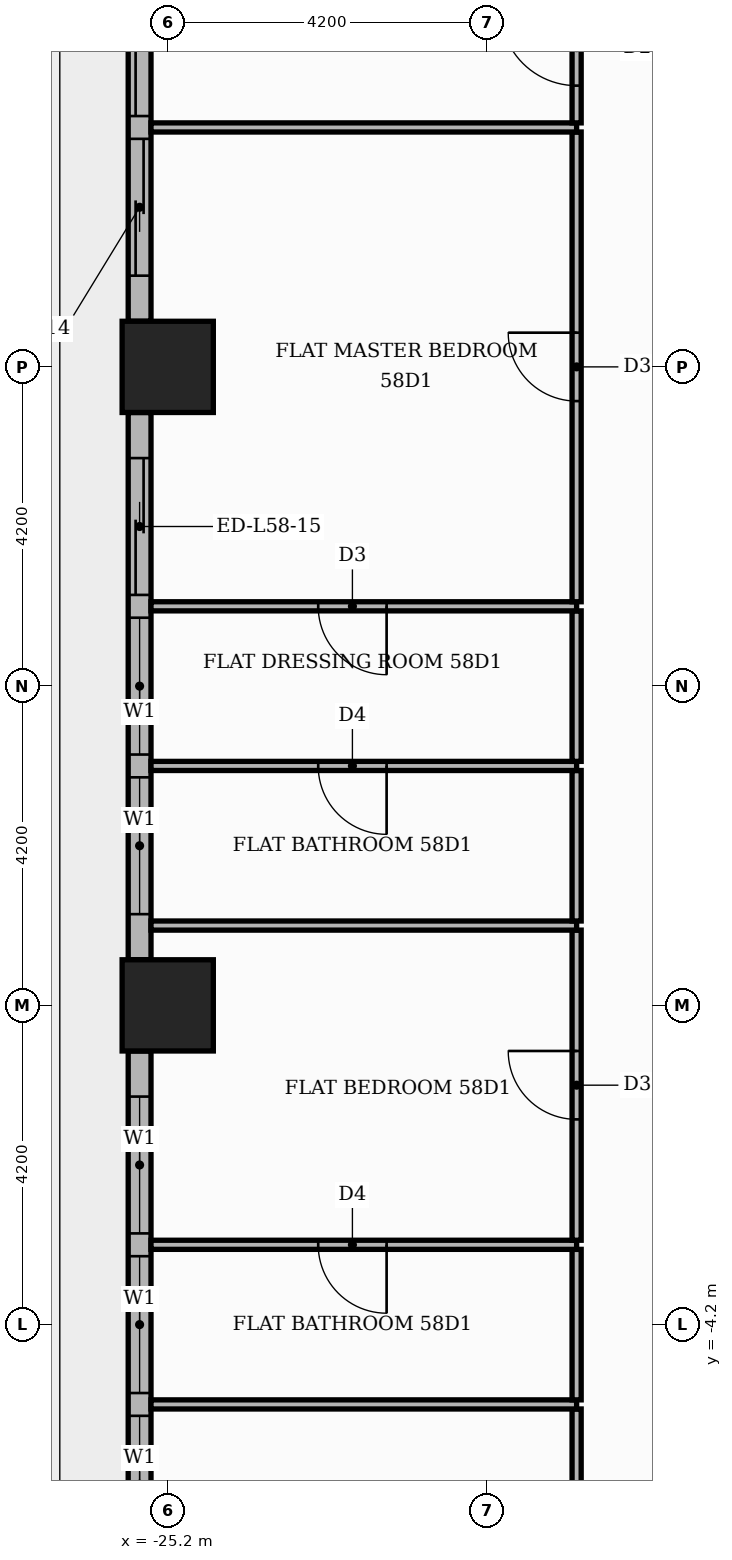
"""IFC4 building model, lengths in metres.
Left out: names, types, materials, properties, quantities, classifications, styles, units other than length and angle.
Written with IfcOpenShell. Run it as: python <this file> out.ifc"""

import sys

from ifc_helpers import new_model, si_unit, direction, frame, frame_2d, origin, origin_2d, place, context, subcontext, project, spatial, rectangle, extrude, element, fill, save


model = new_model("IFC4")
c1 = context("Model", 3, precision=1e-05, world=origin(), true_north=direction((0.0, 1.0)))
c2 = subcontext(c1, "Body", "Model", "MODEL_VIEW")
j1 = project(units=[si_unit("LENGTHUNIT", "METRE"), si_unit("PLANEANGLEUNIT", "RADIAN")], contexts=[c1])
p1 = place(None, origin())
s1 = spatial("IfcSite", under=j1, at=p1, CompositionType="ELEMENT")
p2 = place(p1, origin())
s2 = spatial("IfcBuilding", under=s1, at=p2, CompositionType="ELEMENT")
p3 = place(p2, frame((0.0, 0.0, 244.5)))
s3 = spatial("IfcBuildingStorey", under=s2, at=p3, CompositionType="ELEMENT", Elevation=244.5)
for number, where, z_axis, x_axis in (
    (1, (-25.2, 0.0, 0.0), (0.0, 0.0, 1.0), (1.0, 0.0, 0.0)),
    (2, (-25.2, 8.4, 0.0), (0.0, 0.0, 1.0), (1.0, 0.0, 0.0)),
):
    element("IfcColumn", number, at=place(p3, frame(where, z_axis=z_axis, x_axis=x_axis)), inside=s3, PredefinedType="COLUMN", context=c2, shape_type="SweptSolid", body=[
        extrude(rectangle(XDim=1.2, YDim=1.2, at=origin_2d()), origin(), (0.0, 0.0, 1.0), 3.9),
    ])
p4 = place(p3, frame((-25.57, 16.2, 0.0), z_axis=(0.0, 0.0, 1.0), x_axis=(0.0, -1.0, 0.0)))
e3 = element("IfcWall", 3, at=p4, inside=s3, PredefinedType="STANDARD", context=c2, shape_type="SweptSolid", body=[
    extrude(rectangle(XDim=7.2, YDim=0.3, at=frame_2d((3.6, 0.0))), origin(), (0.0, 0.0, 1.0), 3.48),
])
p5 = place(p4, frame((0.6, 0.0, 0.0)))
e4 = element("IfcOpeningElement", 4, at=p5, cuts=e3, PredefinedType="OPENING", context=c2, shape_type="SweptSolid", body=[
    extrude(rectangle(XDim=3.9, YDim=2.4, at=frame_2d((1.95, 1.2))), frame((0.0, 0.16, 0.0), z_axis=(0.0, -1.0, 0.0), x_axis=(1.0, 0.0, 0.0)), (0.0, 0.0, 1.0), 0.32),
])
p6 = place(p4, frame((4.8, 0.0, 0.0)))
e5 = element("IfcOpeningElement", 5, at=p6, cuts=e3, PredefinedType="OPENING", context=c2, shape_type="SweptSolid", body=[
    extrude(rectangle(XDim=1.8, YDim=2.4, at=frame_2d((0.9, 1.2))), frame((0.0, 0.16, 0.0), z_axis=(0.0, -1.0, 0.0), x_axis=(1.0, 0.0, 0.0)), (0.0, 0.0, 1.0), 0.32),
])
p7 = place(p3, frame((-25.57, 7.8, 0.0), z_axis=(0.0, 0.0, 1.0), x_axis=(0.0, -1.0, 0.0)))
e6 = element("IfcWall", 6, at=p7, inside=s3, PredefinedType="STANDARD", context=c2, shape_type="SweptSolid", body=[
    extrude(rectangle(XDim=7.2, YDim=0.3, at=frame_2d((3.6, 0.0))), origin(), (0.0, 0.0, 1.0), 3.48),
])
p8 = place(p7, frame((0.6, 0.0, 0.0)))
e7 = element("IfcOpeningElement", 7, at=p8, cuts=e6, PredefinedType="OPENING", context=c2, shape_type="SweptSolid", body=[
    extrude(rectangle(XDim=1.8, YDim=2.4, at=frame_2d((0.9, 1.2))), frame((0.0, 0.16, 0.0), z_axis=(0.0, -1.0, 0.0), x_axis=(1.0, 0.0, 0.0)), (0.0, 0.0, 1.0), 0.32),
])
p9 = place(p7, frame((2.7, 0.0, 0.9)))
e8 = element("IfcOpeningElement", 8, at=p9, cuts=e6, PredefinedType="OPENING", context=c2, shape_type="SweptSolid", body=[
    extrude(rectangle(XDim=1.8, YDim=2.1, at=frame_2d((0.9, 1.05))), frame((0.0, 0.16, 0.0), z_axis=(0.0, -1.0, 0.0), x_axis=(1.0, 0.0, 0.0)), (0.0, 0.0, 1.0), 0.32),
])
p10 = place(p7, frame((4.8, 0.0, 0.9)))
e9 = element("IfcOpeningElement", 9, at=p10, cuts=e6, PredefinedType="OPENING", context=c2, shape_type="SweptSolid", body=[
    extrude(rectangle(XDim=1.8, YDim=2.1, at=frame_2d((0.9, 1.05))), frame((0.0, 0.16, 0.0), z_axis=(0.0, -1.0, 0.0), x_axis=(1.0, 0.0, 0.0)), (0.0, 0.0, 1.0), 0.32),
])
p11 = place(p3, frame((-25.57, -0.6, 0.0), z_axis=(0.0, 0.0, 1.0), x_axis=(0.0, -1.0, 0.0)))
e10 = element("IfcWall", 10, at=p11, inside=s3, PredefinedType="STANDARD", context=c2, shape_type="SweptSolid", body=[
    extrude(rectangle(XDim=7.2, YDim=0.3, at=frame_2d((3.6, 0.0))), origin(), (0.0, 0.0, 1.0), 3.48),
])
p12 = place(p11, frame((0.6, 0.0, 0.9)))
e11 = element("IfcOpeningElement", 11, at=p12, cuts=e10, PredefinedType="OPENING", context=c2, shape_type="SweptSolid", body=[
    extrude(rectangle(XDim=1.8, YDim=2.1, at=frame_2d((0.9, 1.05))), frame((0.0, 0.16, 0.0), z_axis=(0.0, -1.0, 0.0), x_axis=(1.0, 0.0, 0.0)), (0.0, 0.0, 1.0), 0.32),
])
p13 = place(p11, frame((2.7, 0.0, 0.9)))
e12 = element("IfcOpeningElement", 12, at=p13, cuts=e10, PredefinedType="OPENING", context=c2, shape_type="SweptSolid", body=[
    extrude(rectangle(XDim=1.8, YDim=2.1, at=frame_2d((0.9, 1.05))), frame((0.0, 0.16, 0.0), z_axis=(0.0, -1.0, 0.0), x_axis=(1.0, 0.0, 0.0)), (0.0, 0.0, 1.0), 0.32),
])
p14 = place(p11, frame((4.8, 0.0, 0.9)))
e13 = element("IfcOpeningElement", 13, at=p14, cuts=e10, PredefinedType="OPENING", context=c2, shape_type="SweptSolid", body=[
    extrude(rectangle(XDim=1.8, YDim=2.1, at=frame_2d((0.9, 1.05))), frame((0.0, 0.16, 0.0), z_axis=(0.0, -1.0, 0.0), x_axis=(1.0, 0.0, 0.0)), (0.0, 0.0, 1.0), 0.32),
])
p15 = place(p3, frame((-19.82, -11.49, 0.0), z_axis=(0.0, 0.0, 1.0), x_axis=(0.0, 1.0, 0.0)))
e14 = element("IfcWall", 14, at=p15, inside=s3, PredefinedType="PARTITIONING", context=c2, shape_type="SweptSolid", body=[
    extrude(rectangle(XDim=6.18, YDim=0.12, at=frame_2d((3.09, 0.0))), origin(), (0.0, 0.0, 1.0), 3.48),
])
p16 = place(p15, frame((2.64, 0.0, 0.0)))
e15 = element("IfcOpeningElement", 15, at=p16, cuts=e14, PredefinedType="OPENING", context=c2, shape_type="SweptSolid", body=[
    extrude(rectangle(XDim=0.9, YDim=2.1, at=frame_2d((0.45, 1.05))), frame((0.0, 0.07, 0.0), z_axis=(0.0, -1.0, 0.0), x_axis=(1.0, 0.0, 0.0)), (0.0, 0.0, 1.0), 0.14),
])
p17 = place(p3, frame((-25.42, -5.25, 0.0), z_axis=(0.0, 0.0, 1.0), x_axis=(1.0, 0.0, 0.0)))
e16 = element("IfcWall", 16, at=p17, inside=s3, PredefinedType="PARTITIONING", context=c2, shape_type="SweptSolid", body=[
    extrude(rectangle(XDim=5.6, YDim=0.12, at=frame_2d((2.8, 0.0))), origin(), (0.0, 0.0, 1.0), 3.48),
])
p18 = place(p3, frame((-19.82, -5.19, 0.0), z_axis=(0.0, 0.0, 1.0), x_axis=(0.0, 1.0, 0.0)))
e17 = element("IfcWall", 17, at=p18, inside=s3, PredefinedType="PARTITIONING", context=c2, shape_type="SweptSolid", body=[
    extrude(rectangle(XDim=1.98, YDim=0.12, at=frame_2d((0.99, 0.0))), origin(), (0.0, 0.0, 1.0), 3.48),
])
p19 = place(p3, frame((-25.42, -3.15, 0.0), z_axis=(0.0, 0.0, 1.0), x_axis=(1.0, 0.0, 0.0)))
e18 = element("IfcWall", 18, at=p19, inside=s3, PredefinedType="PARTITIONING", context=c2, shape_type="SweptSolid", body=[
    extrude(rectangle(XDim=5.6, YDim=0.12, at=frame_2d((2.8, 0.0))), origin(), (0.0, 0.0, 1.0), 3.48),
])
p20 = place(p19, frame((2.2, 0.0, 0.0)))
e19 = element("IfcOpeningElement", 19, at=p20, cuts=e18, PredefinedType="OPENING", context=c2, shape_type="SweptSolid", body=[
    extrude(rectangle(XDim=0.9, YDim=2.1, at=frame_2d((0.45, 1.05))), frame((0.0, 0.07, 0.0), z_axis=(0.0, -1.0, 0.0), x_axis=(1.0, 0.0, 0.0)), (0.0, 0.0, 1.0), 0.14),
])
p21 = place(p3, frame((-19.82, -3.09, 0.0), z_axis=(0.0, 0.0, 1.0), x_axis=(0.0, 1.0, 0.0)))
e20 = element("IfcWall", 20, at=p21, inside=s3, PredefinedType="PARTITIONING", context=c2, shape_type="SweptSolid", body=[
    extrude(rectangle(XDim=4.08, YDim=0.12, at=frame_2d((2.04, 0.0))), origin(), (0.0, 0.0, 1.0), 3.48),
])
p22 = place(p21, frame((1.59, 0.0, 0.0)))
e21 = element("IfcOpeningElement", 21, at=p22, cuts=e20, PredefinedType="OPENING", context=c2, shape_type="SweptSolid", body=[
    extrude(rectangle(XDim=0.9, YDim=2.1, at=frame_2d((0.45, 1.05))), frame((0.0, 0.07, 0.0), z_axis=(0.0, -1.0, 0.0), x_axis=(1.0, 0.0, 0.0)), (0.0, 0.0, 1.0), 0.14),
])
p23 = place(p3, frame((-25.42, 1.05, 0.0), z_axis=(0.0, 0.0, 1.0), x_axis=(1.0, 0.0, 0.0)))
e22 = element("IfcWall", 22, at=p23, inside=s3, PredefinedType="PARTITIONING", context=c2, shape_type="SweptSolid", body=[
    extrude(rectangle(XDim=5.6, YDim=0.12, at=frame_2d((2.8, 0.0))), origin(), (0.0, 0.0, 1.0), 3.48),
])
p24 = place(p3, frame((-19.82, 1.11, 0.0), z_axis=(0.0, 0.0, 1.0), x_axis=(0.0, 1.0, 0.0)))
e23 = element("IfcWall", 23, at=p24, inside=s3, PredefinedType="PARTITIONING", context=c2, shape_type="SweptSolid", body=[
    extrude(rectangle(XDim=1.98, YDim=0.12, at=frame_2d((0.99, 0.0))), origin(), (0.0, 0.0, 1.0), 3.48),
])
p25 = place(p3, frame((-25.42, 3.15, 0.0), z_axis=(0.0, 0.0, 1.0), x_axis=(1.0, 0.0, 0.0)))
e24 = element("IfcWall", 24, at=p25, inside=s3, PredefinedType="PARTITIONING", context=c2, shape_type="SweptSolid", body=[
    extrude(rectangle(XDim=5.6, YDim=0.12, at=frame_2d((2.8, 0.0))), origin(), (0.0, 0.0, 1.0), 3.48),
])
p26 = place(p25, frame((2.2, 0.0, 0.0)))
e25 = element("IfcOpeningElement", 25, at=p26, cuts=e24, PredefinedType="OPENING", context=c2, shape_type="SweptSolid", body=[
    extrude(rectangle(XDim=0.9, YDim=2.1, at=frame_2d((0.45, 1.05))), frame((0.0, 0.07, 0.0), z_axis=(0.0, -1.0, 0.0), x_axis=(1.0, 0.0, 0.0)), (0.0, 0.0, 1.0), 0.14),
])
p27 = place(p3, frame((-19.82, 3.21, 0.0), z_axis=(0.0, 0.0, 1.0), x_axis=(0.0, 1.0, 0.0)))
e26 = element("IfcWall", 26, at=p27, inside=s3, PredefinedType="PARTITIONING", context=c2, shape_type="SweptSolid", body=[
    extrude(rectangle(XDim=1.98, YDim=0.12, at=frame_2d((0.99, 0.0))), origin(), (0.0, 0.0, 1.0), 3.48),
])
p28 = place(p3, frame((-25.42, 5.25, 0.0), z_axis=(0.0, 0.0, 1.0), x_axis=(1.0, 0.0, 0.0)))
e27 = element("IfcWall", 27, at=p28, inside=s3, PredefinedType="PARTITIONING", context=c2, shape_type="SweptSolid", body=[
    extrude(rectangle(XDim=5.6, YDim=0.12, at=frame_2d((2.8, 0.0))), origin(), (0.0, 0.0, 1.0), 3.48),
])
p29 = place(p28, frame((2.2, 0.0, 0.0)))
e28 = element("IfcOpeningElement", 28, at=p29, cuts=e27, PredefinedType="OPENING", context=c2, shape_type="SweptSolid", body=[
    extrude(rectangle(XDim=0.9, YDim=2.1, at=frame_2d((0.45, 1.05))), frame((0.0, 0.07, 0.0), z_axis=(0.0, -1.0, 0.0), x_axis=(1.0, 0.0, 0.0)), (0.0, 0.0, 1.0), 0.14),
])
p30 = place(p3, frame((-19.82, 5.31, 0.0), z_axis=(0.0, 0.0, 1.0), x_axis=(0.0, 1.0, 0.0)))
e29 = element("IfcWall", 29, at=p30, inside=s3, PredefinedType="PARTITIONING", context=c2, shape_type="SweptSolid", body=[
    extrude(rectangle(XDim=6.18, YDim=0.12, at=frame_2d((3.09, 0.0))), origin(), (0.0, 0.0, 1.0), 3.48),
])
p31 = place(p30, frame((2.64, 0.0, 0.0)))
e30 = element("IfcOpeningElement", 30, at=p31, cuts=e29, PredefinedType="OPENING", context=c2, shape_type="SweptSolid", body=[
    extrude(rectangle(XDim=0.9, YDim=2.1, at=frame_2d((0.45, 1.05))), frame((0.0, 0.07, 0.0), z_axis=(0.0, -1.0, 0.0), x_axis=(1.0, 0.0, 0.0)), (0.0, 0.0, 1.0), 0.14),
])
p32 = place(p3, frame((-25.42, 11.55, 0.0), z_axis=(0.0, 0.0, 1.0), x_axis=(1.0, 0.0, 0.0)))
e31 = element("IfcWall", 31, at=p32, inside=s3, PredefinedType="PARTITIONING", context=c2, shape_type="SweptSolid", body=[
    extrude(rectangle(XDim=5.6, YDim=0.12, at=frame_2d((2.8, 0.0))), origin(), (0.0, 0.0, 1.0), 3.48),
])
p33 = place(p3, frame((-19.82, 11.61, 0.0), z_axis=(0.0, 0.0, 1.0), x_axis=(0.0, 1.0, 0.0)))
e32 = element("IfcWall", 32, at=p33, inside=s3, PredefinedType="PARTITIONING", context=c2, shape_type="SweptSolid", body=[
    extrude(rectangle(XDim=1.98, YDim=0.12, at=frame_2d((0.99, 0.0))), origin(), (0.0, 0.0, 1.0), 3.48),
])
p34 = place(p33, frame((0.49, 0.0, 0.0)))
e33 = element("IfcOpeningElement", 33, at=p34, cuts=e32, PredefinedType="OPENING", context=c2, shape_type="SweptSolid", body=[
    extrude(rectangle(XDim=1.0, YDim=2.1, at=frame_2d((0.5, 1.05))), frame((0.0, 0.07, 0.0), z_axis=(0.0, -1.0, 0.0), x_axis=(1.0, 0.0, 0.0)), (0.0, 0.0, 1.0), 0.14),
])
p35 = place(p5, origin())
e34 = element("IfcDoor", 34, at=p35, inside=s3, OperationType="SLIDING_TO_LEFT", PredefinedType="DOOR", context=c2, shape_type="SweptSolid", body=[
    extrude(rectangle(XDim=3.9, YDim=2.4, at=frame_2d((1.95, 1.2))), frame((0.0, 0.025, 0.0), z_axis=(0.0, -1.0, 0.0), x_axis=(1.0, 0.0, 0.0)), (0.0, 0.0, 1.0), 0.05),
])
fill(e4, e34)
p36 = place(p6, origin())
e35 = element("IfcDoor", 35, at=p36, inside=s3, OperationType="SLIDING_TO_RIGHT", PredefinedType="DOOR", context=c2, shape_type="SweptSolid", body=[
    extrude(rectangle(XDim=1.8, YDim=2.4, at=frame_2d((0.9, 1.2))), frame((0.0, 0.025, 0.0), z_axis=(0.0, -1.0, 0.0), x_axis=(1.0, 0.0, 0.0)), (0.0, 0.0, 1.0), 0.05),
])
fill(e5, e35)
p37 = place(p8, origin())
e36 = element("IfcDoor", 36, at=p37, inside=s3, OperationType="SLIDING_TO_LEFT", PredefinedType="DOOR", context=c2, shape_type="SweptSolid", body=[
    extrude(rectangle(XDim=1.8, YDim=2.4, at=frame_2d((0.9, 1.2))), frame((0.0, 0.025, 0.0), z_axis=(0.0, -1.0, 0.0), x_axis=(1.0, 0.0, 0.0)), (0.0, 0.0, 1.0), 0.05),
])
fill(e7, e36)
p38 = place(p9, origin())
e37 = element("IfcWindow", 37, at=p38, inside=s3, PartitioningType="SINGLE_PANEL", PredefinedType="WINDOW", context=c2, shape_type="SweptSolid", body=[
    extrude(rectangle(XDim=1.8, YDim=2.1, at=frame_2d((0.9, 1.05))), frame((0.0, 0.03, 0.0), z_axis=(0.0, -1.0, 0.0), x_axis=(1.0, 0.0, 0.0)), (0.0, 0.0, 1.0), 0.06),
])
fill(e8, e37)
p39 = place(p10, origin())
e38 = element("IfcWindow", 38, at=p39, inside=s3, PartitioningType="SINGLE_PANEL", PredefinedType="WINDOW", context=c2, shape_type="SweptSolid", body=[
    extrude(rectangle(XDim=1.8, YDim=2.1, at=frame_2d((0.9, 1.05))), frame((0.0, 0.03, 0.0), z_axis=(0.0, -1.0, 0.0), x_axis=(1.0, 0.0, 0.0)), (0.0, 0.0, 1.0), 0.06),
])
fill(e9, e38)
p40 = place(p12, origin())
e39 = element("IfcWindow", 39, at=p40, inside=s3, PartitioningType="SINGLE_PANEL", PredefinedType="WINDOW", context=c2, shape_type="SweptSolid", body=[
    extrude(rectangle(XDim=1.8, YDim=2.1, at=frame_2d((0.9, 1.05))), frame((0.0, 0.03, 0.0), z_axis=(0.0, -1.0, 0.0), x_axis=(1.0, 0.0, 0.0)), (0.0, 0.0, 1.0), 0.06),
])
fill(e11, e39)
p41 = place(p13, origin())
e40 = element("IfcWindow", 40, at=p41, inside=s3, PartitioningType="SINGLE_PANEL", PredefinedType="WINDOW", context=c2, shape_type="SweptSolid", body=[
    extrude(rectangle(XDim=1.8, YDim=2.1, at=frame_2d((0.9, 1.05))), frame((0.0, 0.03, 0.0), z_axis=(0.0, -1.0, 0.0), x_axis=(1.0, 0.0, 0.0)), (0.0, 0.0, 1.0), 0.06),
])
fill(e12, e40)
p42 = place(p14, origin())
e41 = element("IfcWindow", 41, at=p42, inside=s3, PartitioningType="SINGLE_PANEL", PredefinedType="WINDOW", context=c2, shape_type="SweptSolid", body=[
    extrude(rectangle(XDim=1.8, YDim=2.1, at=frame_2d((0.9, 1.05))), frame((0.0, 0.03, 0.0), z_axis=(0.0, -1.0, 0.0), x_axis=(1.0, 0.0, 0.0)), (0.0, 0.0, 1.0), 0.06),
])
fill(e13, e41)
p43 = place(p34, origin())
e42 = element("IfcDoor", 42, at=p43, inside=s3, OperationType="SINGLE_SWING_RIGHT", PredefinedType="DOOR", context=c2, shape_type="SweptSolid", body=[
    extrude(rectangle(XDim=1.0, YDim=2.1, at=frame_2d((0.5, 1.05))), frame((0.0, 0.025, 0.0), z_axis=(0.0, -1.0, 0.0), x_axis=(1.0, 0.0, 0.0)), (0.0, 0.0, 1.0), 0.05),
])
fill(e33, e42)
p44 = place(p31, origin())
e43 = element("IfcDoor", 43, at=p44, inside=s3, OperationType="SINGLE_SWING_RIGHT", PredefinedType="DOOR", context=c2, shape_type="SweptSolid", body=[
    extrude(rectangle(XDim=0.9, YDim=2.1, at=frame_2d((0.45, 1.05))), frame((0.0, 0.025, 0.0), z_axis=(0.0, -1.0, 0.0), x_axis=(1.0, 0.0, 0.0)), (0.0, 0.0, 1.0), 0.05),
])
fill(e30, e43)
p45 = place(p29, frame((0.9, 0.0, 0.0), z_axis=(0.0, 0.0, 1.0), x_axis=(-1.0, 0.0, 0.0)))
e44 = element("IfcDoor", 44, at=p45, inside=s3, OperationType="SINGLE_SWING_RIGHT", PredefinedType="DOOR", context=c2, shape_type="SweptSolid", body=[
    extrude(rectangle(XDim=0.9, YDim=2.1, at=frame_2d((0.45, 1.05))), frame((0.0, 0.025, 0.0), z_axis=(0.0, -1.0, 0.0), x_axis=(1.0, 0.0, 0.0)), (0.0, 0.0, 1.0), 0.05),
])
fill(e28, e44)
p46 = place(p26, frame((0.9, 0.0, 0.0), z_axis=(0.0, 0.0, 1.0), x_axis=(-1.0, 0.0, 0.0)))
e45 = element("IfcDoor", 45, at=p46, inside=s3, OperationType="SINGLE_SWING_RIGHT", PredefinedType="DOOR", context=c2, shape_type="SweptSolid", body=[
    extrude(rectangle(XDim=0.9, YDim=2.1, at=frame_2d((0.45, 1.05))), frame((0.0, 0.025, 0.0), z_axis=(0.0, -1.0, 0.0), x_axis=(1.0, 0.0, 0.0)), (0.0, 0.0, 1.0), 0.05),
])
fill(e25, e45)
p47 = place(p22, origin())
e46 = element("IfcDoor", 46, at=p47, inside=s3, OperationType="SINGLE_SWING_RIGHT", PredefinedType="DOOR", context=c2, shape_type="SweptSolid", body=[
    extrude(rectangle(XDim=0.9, YDim=2.1, at=frame_2d((0.45, 1.05))), frame((0.0, 0.025, 0.0), z_axis=(0.0, -1.0, 0.0), x_axis=(1.0, 0.0, 0.0)), (0.0, 0.0, 1.0), 0.05),
])
fill(e21, e46)
p48 = place(p20, frame((0.9, 0.0, 0.0), z_axis=(0.0, 0.0, 1.0), x_axis=(-1.0, 0.0, 0.0)))
e47 = element("IfcDoor", 47, at=p48, inside=s3, OperationType="SINGLE_SWING_RIGHT", PredefinedType="DOOR", context=c2, shape_type="SweptSolid", body=[
    extrude(rectangle(XDim=0.9, YDim=2.1, at=frame_2d((0.45, 1.05))), frame((0.0, 0.025, 0.0), z_axis=(0.0, -1.0, 0.0), x_axis=(1.0, 0.0, 0.0)), (0.0, 0.0, 1.0), 0.05),
])
fill(e19, e47)
save(model, sys.argv[1])
